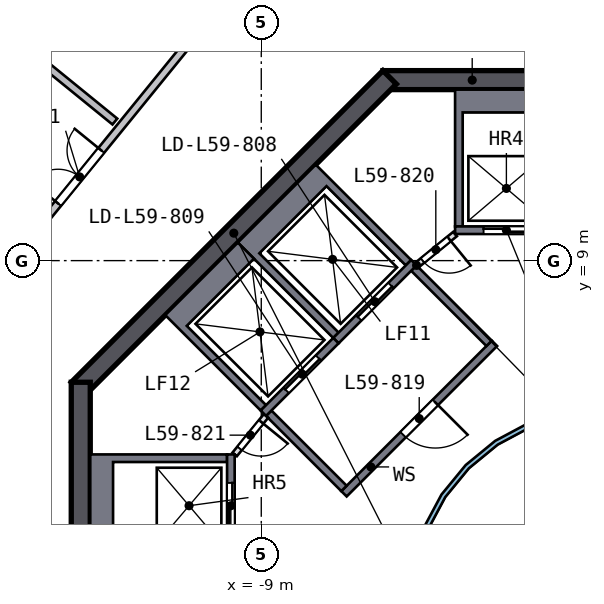
"""IFC4 building model, lengths in metres.
Left out: names, types, materials, properties, quantities, classifications, styles, units other than length and angle.
Written with IfcOpenShell. Run it as: python <this file> out.ifc"""

import sys

from ifc_helpers import new_model, si_unit, direction, frame, frame_2d, origin, place, context, subcontext, project, spatial, polyline, rectangle, outline, extrude, element, fill, save


model = new_model("IFC4")
c1 = context("Model", 3, precision=1e-05, world=origin(), true_north=direction((0.0, 1.0)))
c2 = subcontext(c1, "Body", "Model", "MODEL_VIEW")
j1 = project(units=[si_unit("LENGTHUNIT", "METRE"), si_unit("PLANEANGLEUNIT", "RADIAN")], contexts=[c1])
p1 = place(None, origin())
s1 = spatial("IfcSite", under=j1, at=p1, CompositionType="ELEMENT")
p2 = place(p1, origin())
s2 = spatial("IfcBuilding", under=s1, at=p2, CompositionType="ELEMENT")
p3 = place(p2, frame((0.0, 0.0, 241.0)))
s3 = spatial("IfcBuildingStorey", under=s2, at=p3, CompositionType="ELEMENT", Elevation=241.0)
p4 = place(p3, frame((5.799, 13.75, 0.0), z_axis=(0.0, 0.0, 1.0), x_axis=(-1.0, 0.0, 0.0)))
e1 = element("IfcWall", 1, at=p4, inside=s3, PredefinedType="SHEAR", context=c2, shape_type="SweptSolid", body=[
    extrude(rectangle(XDim=11.598, YDim=0.5, at=frame_2d((5.799, 0.0))), origin(), (0.0, 0.0, 1.0), 3.5),
])
p5 = place(p4, frame((4.899, 0.0, 0.0)))
e2 = element("IfcOpeningElement", 2, at=p5, cuts=e1, PredefinedType="OPENING", context=c2, shape_type="SweptSolid", body=[
    extrude(rectangle(XDim=1.8, YDim=2.1, at=frame_2d((0.9, 1.05))), frame((0.0, 0.26, 0.0), z_axis=(0.0, -1.0, 0.0), x_axis=(1.0, 0.0, 0.0)), (0.0, 0.0, 1.0), 0.52),
])
p6 = place(p3, frame((-5.622, 13.823, 0.0), z_axis=(0.0, 0.0, 1.0), x_axis=(-0.707106781, -0.707106781, 0.0)))
e3 = element("IfcWall", 3, at=p6, inside=s3, PredefinedType="SHEAR", context=c2, shape_type="SweptSolid", body=[
    extrude(rectangle(XDim=11.598, YDim=0.5, at=frame_2d((5.799, 0.0))), origin(), (0.0, 0.0, 1.0), 3.5),
])
p7 = place(p3, frame((-13.75, 5.799, 0.0), z_axis=(0.0, 0.0, 1.0), x_axis=(0.0, -1.0, 0.0)))
e4 = element("IfcWall", 4, at=p7, inside=s3, PredefinedType="SHEAR", context=c2, shape_type="SweptSolid", body=[
    extrude(rectangle(XDim=11.598, YDim=0.5, at=frame_2d((5.799, 0.0))), origin(), (0.0, 0.0, 1.0), 3.5),
])
p8 = place(p7, frame((4.899, 0.0, 0.0)))
e5 = element("IfcOpeningElement", 5, at=p8, cuts=e4, PredefinedType="OPENING", context=c2, shape_type="SweptSolid", body=[
    extrude(rectangle(XDim=1.8, YDim=2.1, at=frame_2d((0.9, 1.05))), frame((0.0, 0.26, 0.0), z_axis=(0.0, -1.0, 0.0), x_axis=(1.0, 0.0, 0.0)), (0.0, 0.0, 1.0), 0.52),
])
p9 = place(p3, origin())
e6 = element("IfcWall", 6, at=p9, inside=s3, PredefinedType="SOLIDWALL", context=c2, shape_type="SweptSolid", body=[
    extrude(outline(polyline([(-3.9, 13.5), (-1.2, 13.5), (-1.2, 9.9), (-1.4, 9.9), (-1.4, 12.9), (-3.7, 12.9), (-3.7, 9.9), (-3.9, 9.9), (-3.9, 13.5)])), origin(), (0.0, 0.0, 1.0), 3.19),
])
p10 = place(p3, frame((-1.2, 9.8, 0.0), z_axis=(0.0, 0.0, 1.0), x_axis=(-1.0, 0.0, 0.0)))
e7 = element("IfcWall", 7, at=p10, inside=s3, PredefinedType="SOLIDWALL", context=c2, shape_type="SweptSolid", body=[
    extrude(rectangle(XDim=2.7, YDim=0.2, at=frame_2d((1.35, 0.0))), origin(), (0.0, 0.0, 1.0), 3.19),
])
p11 = place(p10, frame((0.75, 0.0, 0.0)))
e8 = element("IfcOpeningElement", 8, at=p11, cuts=e7, PredefinedType="OPENING", context=c2, shape_type="SweptSolid", body=[
    extrude(rectangle(XDim=1.2, YDim=2.1, at=frame_2d((0.6, 1.05))), frame((0.0, 0.11, 0.0), z_axis=(0.0, -1.0, 0.0), x_axis=(1.0, 0.0, 0.0)), (0.0, 0.0, 1.0), 0.22),
])
p12 = place(p3, origin())
e9 = element("IfcWall", 9, at=p12, inside=s3, PredefinedType="SOLIDWALL", context=c2, shape_type="SweptSolid", body=[
    extrude(outline(polyline([(-13.5, 3.9), (-9.9, 3.9), (-9.9, 3.7), (-12.9, 3.7), (-12.9, 1.4), (-9.9, 1.4), (-9.9, 1.2), (-13.5, 1.2), (-13.5, 3.9)])), origin(), (0.0, 0.0, 1.0), 3.19),
])
p13 = place(p3, frame((-9.8, 1.2, 0.0), z_axis=(0.0, 0.0, 1.0), x_axis=(0.0, 1.0, 0.0)))
e10 = element("IfcWall", 10, at=p13, inside=s3, PredefinedType="SOLIDWALL", context=c2, shape_type="SweptSolid", body=[
    extrude(rectangle(XDim=2.7, YDim=0.2, at=frame_2d((1.35, 0.0))), origin(), (0.0, 0.0, 1.0), 3.19),
])
p14 = place(p13, frame((0.75, 0.0, 0.0)))
e11 = element("IfcOpeningElement", 11, at=p14, cuts=e10, PredefinedType="OPENING", context=c2, shape_type="SweptSolid", body=[
    extrude(rectangle(XDim=1.2, YDim=2.1, at=frame_2d((0.6, 1.05))), frame((0.0, 0.11, 0.0), z_axis=(0.0, -1.0, 0.0), x_axis=(1.0, 0.0, 0.0)), (0.0, 0.0, 1.0), 0.22),
])
p15 = place(p3, origin())
e12 = element("IfcWall", 12, at=p15, inside=s3, PredefinedType="SOLIDWALL", context=c2, shape_type="SweptSolid", body=[
    extrude(outline(polyline([(-9.617, 9.475), (-7.566, 11.526), (-5.056, 9.016), (-5.197, 8.874), (-7.283, 10.96), (-9.051, 9.192), (-6.965, 7.106), (-7.106, 6.965), (-9.617, 9.475)])), origin(), (0.0, 0.0, 1.0), 3.19),
])
p16 = place(p3, frame((-4.985, 8.945, 0.0), z_axis=(0.0, 0.0, 1.0), x_axis=(-0.707106781, -0.707106781, 0.0)))
e13 = element("IfcWall", 13, at=p16, inside=s3, PredefinedType="SOLIDWALL", context=c2, shape_type="SweptSolid", body=[
    extrude(rectangle(XDim=2.9, YDim=0.2, at=frame_2d((1.45, 0.0))), origin(), (0.0, 0.0, 1.0), 3.19),
])
p17 = place(p16, frame((0.85, 0.0, 0.0)))
e14 = element("IfcOpeningElement", 14, at=p17, cuts=e13, PredefinedType="OPENING", context=c2, shape_type="SweptSolid", body=[
    extrude(rectangle(XDim=1.2, YDim=2.1, at=frame_2d((0.6, 1.05))), frame((0.0, 0.11, 0.0), z_axis=(0.0, -1.0, 0.0), x_axis=(1.0, 0.0, 0.0)), (0.0, 0.0, 1.0), 0.22),
])
p18 = place(p3, origin())
e15 = element("IfcWall", 15, at=p18, inside=s3, PredefinedType="SOLIDWALL", context=c2, shape_type="SweptSolid", body=[
    extrude(outline(polyline([(-11.526, 7.566), (-9.617, 9.475), (-9.192, 9.051), (-10.96, 7.283), (-8.874, 5.197), (-9.016, 5.056), (-11.526, 7.566)])), origin(), (0.0, 0.0, 1.0), 3.19),
])
p19 = place(p3, frame((-7.036, 6.894, 0.0), z_axis=(0.0, 0.0, 1.0), x_axis=(-0.707106781, -0.707106781, 0.0)))
e16 = element("IfcWall", 16, at=p19, inside=s3, PredefinedType="SOLIDWALL", context=c2, shape_type="SweptSolid", body=[
    extrude(rectangle(XDim=2.7, YDim=0.2, at=frame_2d((1.35, 0.0))), origin(), (0.0, 0.0, 1.0), 3.19),
])
p20 = place(p19, frame((0.65, 0.0, 0.0)))
e17 = element("IfcOpeningElement", 17, at=p20, cuts=e16, PredefinedType="OPENING", context=c2, shape_type="SweptSolid", body=[
    extrude(rectangle(XDim=1.2, YDim=2.1, at=frame_2d((0.6, 1.05))), frame((0.0, 0.11, 0.0), z_axis=(0.0, -1.0, 0.0), x_axis=(1.0, 0.0, 0.0)), (0.0, 0.0, 1.0), 0.22),
])
p21 = place(p3, frame((-2.864, 6.823, 0.0), z_axis=(0.0, 0.0, 1.0), x_axis=(-0.707106781, -0.707106781, 0.0)))
e18 = element("IfcWall", 18, at=p21, inside=s3, PredefinedType="SOLIDWALL", context=c2, shape_type="SweptSolid", body=[
    extrude(rectangle(XDim=5.6, YDim=0.2, at=frame_2d((2.8, 0.0))), origin(), (0.0, 0.0, 1.0), 3.19),
])
p22 = place(p21, frame((2.2, 0.0, 0.0)))
e19 = element("IfcOpeningElement", 19, at=p22, cuts=e18, PredefinedType="OPENING", context=c2, shape_type="SweptSolid", body=[
    extrude(rectangle(XDim=1.2, YDim=2.1, at=frame_2d((0.6, 1.05))), frame((0.0, 0.11, 0.0), z_axis=(0.0, -1.0, 0.0), x_axis=(1.0, 0.0, 0.0)), (0.0, 0.0, 1.0), 0.22),
])
for number, where, z_axis, x_axis in (
    (20, (-3.005, 6.823, 0.0), (0.0, 0.0, 1.0), (-0.707, 0.707, 0.0)),
    (21, (-6.823, 3.005, 0.0), (0.0, 0.0, 1.0), (-0.707, 0.707, 0.0)),
):
    element("IfcWall", number, at=place(p3, frame(where, z_axis=z_axis, x_axis=x_axis)), inside=s3, PredefinedType="SOLIDWALL", context=c2, shape_type="SweptSolid", body=[
        extrude(rectangle(XDim=2.8, YDim=0.2, at=frame_2d((1.4, 0.0))), origin(), (0.0, 0.0, 1.0), 3.19),
    ])
p23 = place(p3, frame((-3.9, 9.7, 0.0), z_axis=(0.0, 0.0, 1.0), x_axis=(-0.775559878, -0.631274009, 0.0)))
e22 = element("IfcWall", 22, at=p23, inside=s3, PredefinedType="PARTITIONING", context=c2, shape_type="SweptSolid", body=[
    extrude(rectangle(XDim=1.308, YDim=0.15, at=frame_2d((0.654, 0.0))), origin(), (0.0, 0.0, 1.0), 3.19),
])
p24 = place(p23, frame((0.204, 0.0, 0.0)))
e23 = element("IfcOpeningElement", 23, at=p24, cuts=e22, PredefinedType="OPENING", context=c2, shape_type="SweptSolid", body=[
    extrude(rectangle(XDim=0.9, YDim=2.1, at=frame_2d((0.45, 1.05))), frame((0.0, 0.085, 0.0), z_axis=(0.0, -1.0, 0.0), x_axis=(1.0, 0.0, 0.0)), (0.0, 0.0, 1.0), 0.17),
])
p25 = place(p3, frame((-8.874, 4.914, 0.0), z_axis=(0.0, 0.0, 1.0), x_axis=(-0.631274009, -0.775559878, 0.0)))
e24 = element("IfcWall", 24, at=p25, inside=s3, PredefinedType="PARTITIONING", context=c2, shape_type="SweptSolid", body=[
    extrude(rectangle(XDim=1.308, YDim=0.15, at=frame_2d((0.654, 0.0))), origin(), (0.0, 0.0, 1.0), 3.19),
])
p26 = place(p25, frame((0.204, 0.0, 0.0)))
e25 = element("IfcOpeningElement", 25, at=p26, cuts=e24, PredefinedType="OPENING", context=c2, shape_type="SweptSolid", body=[
    extrude(rectangle(XDim=0.9, YDim=2.1, at=frame_2d((0.45, 1.05))), frame((0.0, 0.085, 0.0), z_axis=(0.0, -1.0, 0.0), x_axis=(1.0, 0.0, 0.0)), (0.0, 0.0, 1.0), 0.17),
])
p27 = place(p3, origin())
e26 = element("IfcWall", 26, at=p27, inside=s3, PredefinedType="SOLIDWALL", context=c2, shape_type="SweptSolid", body=[
    extrude(outline(polyline([(5.021, -0.999), (4.73, -1.959), (4.257, -2.844), (3.62, -3.62), (2.844, -4.257), (1.959, -4.73), (0.999, -5.021), (0.0, -5.12), (-0.999, -5.021), (-1.959, -4.73), (-2.844, -4.257), (-3.62, -3.62), (-4.257, -2.844), (-4.73, -1.959), (-5.021, -0.999), (-5.12, 0.0), (-5.021, 0.999), (-4.73, 1.959), (-4.257, 2.844), (-3.62, 3.62), (-2.844, 4.257), (-1.959, 4.73), (-0.999, 5.021), (0.0, 5.12), (0.999, 5.021), (1.959, 4.73), (2.844, 4.257), (3.62, 3.62), (4.257, 2.844), (4.73, 1.959), (5.021, 0.999), (5.12, 0.0), (5.021, -0.999)]), holes=[polyline([(4.904, 0.976), (4.619, 1.913), (4.157, 2.778), (3.535, 3.535), (2.778, 4.157), (1.913, 4.619), (0.976, 4.904), (0.0, 5.0), (-0.976, 4.904), (-1.913, 4.619), (-2.778, 4.157), (-3.535, 3.535), (-4.157, 2.778), (-4.619, 1.913), (-4.904, 0.976), (-5.0, 0.0), (-4.904, -0.976), (-4.619, -1.913), (-4.157, -2.778), (-3.535, -3.535), (-2.778, -4.157), (-1.913, -4.619), (-0.976, -4.904), (0.0, -5.0), (0.976, -4.904), (1.913, -4.619), (2.778, -4.157), (3.535, -3.535), (4.157, -2.778), (4.619, -1.913), (4.904, -0.976), (5.0, 0.0), (4.904, 0.976)])]), origin(), (0.0, 0.0, 1.0), 3.19),
])
p28 = place(p3, frame((-16.78, 7.513, 0.0), z_axis=(0.0, 0.0, 1.0), x_axis=(0.630941799, 0.775830166, 0.0)))
e27 = element("IfcWall", 27, at=p28, inside=s3, PredefinedType="SOLIDWALL", context=c2, shape_type="SweptSolid", body=[
    extrude(rectangle(XDim=9.316, YDim=0.2, at=frame_2d((4.658, 0.0))), origin(), (0.0, 0.0, 1.0), 3.19),
])
p29 = place(p28, frame((3.856, 0.0, 0.0)))
e28 = element("IfcOpeningElement", 28, at=p29, cuts=e27, PredefinedType="OPENING", context=c2, shape_type="SweptSolid", body=[
    extrude(rectangle(XDim=1.8, YDim=2.1, at=frame_2d((0.9, 1.05))), frame((0.0, 0.11, 0.0), z_axis=(0.0, -1.0, 0.0), x_axis=(1.0, 0.0, 0.0)), (0.0, 0.0, 1.0), 0.22),
])
p30 = place(p3, frame((-23.421, 21.255, 0.0), z_axis=(0.0, 0.0, 1.0), x_axis=(0.775834344, -0.630936662, 0.0)))
e29 = element("IfcWall", 29, at=p30, inside=s3, PredefinedType="SOLIDWALL", context=c2, shape_type="SweptSolid", body=[
    extrude(rectangle(XDim=13.623, YDim=0.2, at=frame_2d((6.811, 0.0))), origin(), (0.0, 0.0, 1.0), 3.19),
])
p31 = place(p30, frame((4.25, 0.0, 0.0)))
e30 = element("IfcOpeningElement", 30, at=p31, cuts=e29, PredefinedType="OPENING", context=c2, shape_type="SweptSolid", body=[
    extrude(rectangle(XDim=1.0, YDim=2.1, at=frame_2d((0.5, 1.05))), frame((0.0, 0.11, 0.0), z_axis=(0.0, -1.0, 0.0), x_axis=(1.0, 0.0, 0.0)), (0.0, 0.0, 1.0), 0.22),
])
p32 = place(p11, origin())
e31 = element("IfcDoor", 31, at=p32, inside=s3, OperationType="DOUBLE_DOOR_SLIDING", PredefinedType="DOOR", context=c2, shape_type="SweptSolid", body=[
    extrude(rectangle(XDim=1.2, YDim=2.1, at=frame_2d((0.6, 1.05))), frame((0.0, 0.025, 0.0), z_axis=(0.0, -1.0, 0.0), x_axis=(1.0, 0.0, 0.0)), (0.0, 0.0, 1.0), 0.05),
])
fill(e8, e31)
p33 = place(p14, origin())
e32 = element("IfcDoor", 32, at=p33, inside=s3, OperationType="DOUBLE_DOOR_SLIDING", PredefinedType="DOOR", context=c2, shape_type="SweptSolid", body=[
    extrude(rectangle(XDim=1.2, YDim=2.1, at=frame_2d((0.6, 1.05))), frame((0.0, 0.025, 0.0), z_axis=(0.0, -1.0, 0.0), x_axis=(1.0, 0.0, 0.0)), (0.0, 0.0, 1.0), 0.05),
])
fill(e11, e32)
p34 = place(p17, origin())
e33 = element("IfcDoor", 33, at=p34, inside=s3, OperationType="DOUBLE_DOOR_SLIDING", PredefinedType="DOOR", context=c2, shape_type="SweptSolid", body=[
    extrude(rectangle(XDim=1.2, YDim=2.1, at=frame_2d((0.6, 1.05))), frame((0.0, 0.025, 0.0), z_axis=(0.0, -1.0, 0.0), x_axis=(1.0, 0.0, 0.0)), (0.0, 0.0, 1.0), 0.05),
])
fill(e14, e33)
p35 = place(p20, origin())
e34 = element("IfcDoor", 34, at=p35, inside=s3, OperationType="DOUBLE_DOOR_SLIDING", PredefinedType="DOOR", context=c2, shape_type="SweptSolid", body=[
    extrude(rectangle(XDim=1.2, YDim=2.1, at=frame_2d((0.6, 1.05))), frame((0.0, 0.025, 0.0), z_axis=(0.0, -1.0, 0.0), x_axis=(1.0, 0.0, 0.0)), (0.0, 0.0, 1.0), 0.05),
])
fill(e17, e34)
p36 = place(p22, origin())
e35 = element("IfcDoor", 35, at=p36, inside=s3, OperationType="SINGLE_SWING_LEFT", PredefinedType="DOOR", context=c2, shape_type="SweptSolid", body=[
    extrude(rectangle(XDim=1.2, YDim=2.1, at=frame_2d((0.6, 1.05))), frame((0.0, 0.025, 0.0), z_axis=(0.0, -1.0, 0.0), x_axis=(1.0, 0.0, 0.0)), (0.0, 0.0, 1.0), 0.05),
])
fill(e19, e35)
p37 = place(p24, origin())
e36 = element("IfcDoor", 36, at=p37, inside=s3, OperationType="SINGLE_SWING_LEFT", PredefinedType="DOOR", context=c2, shape_type="SweptSolid", body=[
    extrude(rectangle(XDim=0.9, YDim=2.1, at=frame_2d((0.45, 1.05))), frame((0.0, 0.025, 0.0), z_axis=(0.0, -1.0, 0.0), x_axis=(1.0, 0.0, 0.0)), (0.0, 0.0, 1.0), 0.05),
])
fill(e23, e36)
p38 = place(p26, origin())
e37 = element("IfcDoor", 37, at=p38, inside=s3, OperationType="SINGLE_SWING_LEFT", PredefinedType="DOOR", context=c2, shape_type="SweptSolid", body=[
    extrude(rectangle(XDim=0.9, YDim=2.1, at=frame_2d((0.45, 1.05))), frame((0.0, 0.025, 0.0), z_axis=(0.0, -1.0, 0.0), x_axis=(1.0, 0.0, 0.0)), (0.0, 0.0, 1.0), 0.05),
])
fill(e25, e37)
p39 = place(p29, origin())
e38 = element("IfcDoor", 38, at=p39, inside=s3, OperationType="DOUBLE_DOOR_SINGLE_SWING", PredefinedType="DOOR", context=c2, shape_type="SweptSolid", body=[
    extrude(rectangle(XDim=1.8, YDim=2.1, at=frame_2d((0.9, 1.05))), frame((0.0, 0.025, 0.0), z_axis=(0.0, -1.0, 0.0), x_axis=(1.0, 0.0, 0.0)), (0.0, 0.0, 1.0), 0.05),
])
fill(e28, e38)
save(model, sys.argv[1])
